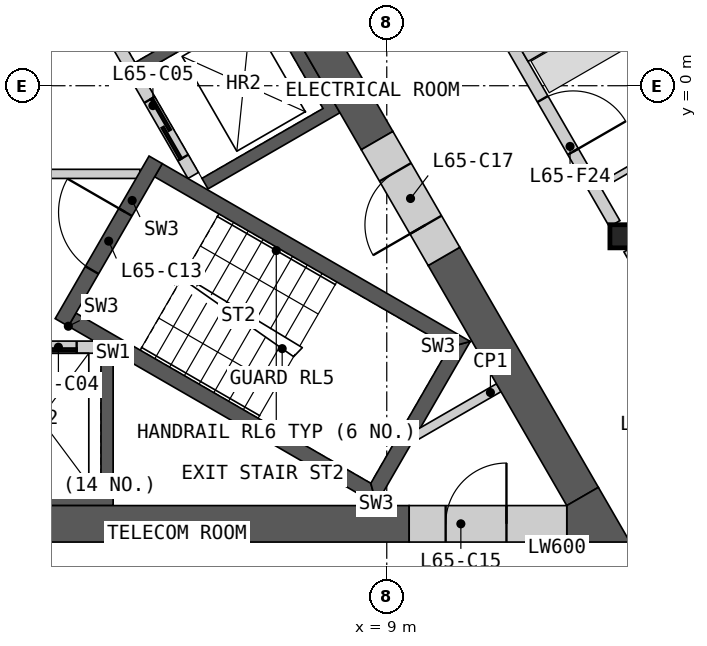
"""IFC4 building model, lengths in metres.
Left out: names, types, materials, properties, quantities, classifications, styles, units other than length and angle.
Written with IfcOpenShell. Run it as: python <this file> out.ifc"""

import sys

from ifc_helpers import new_model, si_unit, direction, frame, frame_2d, origin, origin_2d, place, context, subcontext, project, spatial, polyline, rectangle, i_section, outline, extrude, element, fill, save


model = new_model("IFC4")
c1 = context("Model", 3, precision=1e-05, world=origin(), true_north=direction((0.0, 1.0)))
c2 = subcontext(c1, "Body", "Model", "MODEL_VIEW")
j1 = project(units=[si_unit("LENGTHUNIT", "METRE"), si_unit("PLANEANGLEUNIT", "RADIAN")], contexts=[c1])
p1 = place(None, origin())
s1 = spatial("IfcSite", under=j1, at=p1, CompositionType="ELEMENT")
p2 = place(p1, origin())
s2 = spatial("IfcBuilding", under=s1, at=p2, CompositionType="ELEMENT")
p3 = place(p2, frame((0.0, 0.0, 301.8)))
s3 = spatial("IfcBuildingStorey", under=s2, at=p3, CompositionType="ELEMENT", Elevation=301.8)
p4 = place(p3, frame((12.868, -2.476, 0.0), z_axis=(0.0, 0.0, 1.0), x_axis=(1.0, 0.0, 0.0)))
e1 = element("IfcColumn", 1, at=p4, inside=s3, PredefinedType="COLUMN", context=c2, shape_type="SweptSolid", body=[
    extrude(i_section(OverallWidth=0.396, OverallDepth=0.381, WebThickness=0.019, FlangeThickness=0.03, at=origin_2d()), origin(), (0.0, 0.0, 1.0), 3.4),
])
p5 = place(p3, origin())
e2 = element("IfcWall", 2, at=p5, inside=s3, PredefinedType="SHEAR", context=c2, shape_type="SweptSolid", body=[
    extrude(outline(polyline([(4.5, -4.4), (4.5, -6.906), (-4.5, -6.906), (-4.5, -4.4), (-4.3, -4.4), (-4.3, -6.7), (-2.3, -6.7), (-2.3, -4.4), (-2.1, -4.4), (-2.1, -6.7), (-0.1, -6.7), (-0.1, -4.4), (0.1, -4.4), (0.1, -6.7), (2.1, -6.7), (2.1, -4.4), (2.3, -4.4), (2.3, -6.7), (4.3, -6.7), (4.3, -4.4), (4.5, -4.4)])), origin(), (0.0, 0.0, 1.0), 3.1),
])
p6 = place(p3, frame((-4.187, -4.3, 0.0), z_axis=(0.0, 0.0, 1.0), x_axis=(1.0, 0.0, 0.0)))
e3 = element("IfcWall", 3, at=p6, inside=s3, PredefinedType="SOLIDWALL", context=c2, shape_type="SweptSolid", body=[
    extrude(rectangle(XDim=8.373, YDim=0.2, at=frame_2d((4.187, 0.0))), origin(), (0.0, 0.0, 1.0), 3.1),
])
p7 = place(p6, frame((0.287, 0.0, 0.0)))
e4 = element("IfcOpeningElement", 4, at=p7, cuts=e3, PredefinedType="OPENING", context=c2, shape_type="SweptSolid", body=[
    extrude(rectangle(XDim=1.2, YDim=2.1, at=frame_2d((0.6, 1.05))), frame((0.0, 0.11, 0.0), z_axis=(0.0, -1.0, 0.0), x_axis=(1.0, 0.0, 0.0)), (0.0, 0.0, 1.0), 0.22),
])
p8 = place(p6, frame((2.387, 0.0, 0.0)))
e5 = element("IfcOpeningElement", 5, at=p8, cuts=e3, PredefinedType="OPENING", context=c2, shape_type="SweptSolid", body=[
    extrude(rectangle(XDim=1.4, YDim=2.1, at=frame_2d((0.7, 1.05))), frame((0.0, 0.11, 0.0), z_axis=(0.0, -1.0, 0.0), x_axis=(1.0, 0.0, 0.0)), (0.0, 0.0, 1.0), 0.22),
])
p9 = place(p6, frame((4.737, 0.0, 0.0)))
e6 = element("IfcOpeningElement", 6, at=p9, cuts=e3, PredefinedType="OPENING", context=c2, shape_type="SweptSolid", body=[
    extrude(rectangle(XDim=1.1, YDim=2.1, at=frame_2d((0.55, 1.05))), frame((0.0, 0.11, 0.0), z_axis=(0.0, -1.0, 0.0), x_axis=(1.0, 0.0, 0.0)), (0.0, 0.0, 1.0), 0.22),
])
p10 = place(p6, frame((6.887, 0.0, 0.0)))
e7 = element("IfcOpeningElement", 7, at=p10, cuts=e3, PredefinedType="OPENING", context=c2, shape_type="SweptSolid", body=[
    extrude(rectangle(XDim=1.2, YDim=2.1, at=frame_2d((0.6, 1.05))), frame((0.0, 0.11, 0.0), z_axis=(0.0, -1.0, 0.0), x_axis=(1.0, 0.0, 0.0)), (0.0, 0.0, 1.0), 0.22),
])
p11 = place(p3, origin())
e8 = element("IfcWall", 8, at=p11, inside=s3, PredefinedType="SHEAR", context=c2, shape_type="SweptSolid", body=[
    extrude(outline(polyline([(1.561, 6.097), (3.731, 7.35), (8.231, -0.444), (6.061, -1.697), (5.96, -1.524), (7.952, -0.374), (6.952, 1.358), (4.96, 0.208), (4.861, 0.381), (6.852, 1.531), (5.852, 3.263), (3.861, 2.113), (3.76, 2.287), (5.752, 3.437), (4.752, 5.169), (2.76, 4.019), (2.66, 4.192), (4.652, 5.342), (3.652, 7.074), (1.66, 5.924), (1.561, 6.097)])), origin(), (0.0, 0.0, 1.0), 3.1),
])
p12 = place(p3, frame((5.817, -1.476, 0.0), z_axis=(0.0, 0.0, 1.0), x_axis=(-0.500002616675, 0.866023893041, 0.0)))
e9 = element("IfcWall", 9, at=p12, inside=s3, PredefinedType="SOLIDWALL", context=c2, shape_type="SweptSolid", body=[
    extrude(rectangle(XDim=8.373, YDim=0.2, at=frame_2d((4.187, 0.0))), origin(), (0.0, 0.0, 1.0), 3.1),
])
p13 = place(p12, frame((0.337, 0.0, 0.0)))
e10 = element("IfcOpeningElement", 10, at=p13, cuts=e9, PredefinedType="OPENING", context=c2, shape_type="SweptSolid", body=[
    extrude(rectangle(XDim=1.1, YDim=2.1, at=frame_2d((0.55, 1.05))), frame((0.0, 0.11, 0.0), z_axis=(0.0, -1.0, 0.0), x_axis=(1.0, 0.0, 0.0)), (0.0, 0.0, 1.0), 0.22),
])
p14 = place(p12, frame((2.537, 0.0, 0.0)))
e11 = element("IfcOpeningElement", 11, at=p14, cuts=e9, PredefinedType="OPENING", context=c2, shape_type="SweptSolid", body=[
    extrude(rectangle(XDim=1.1, YDim=2.1, at=frame_2d((0.55, 1.05))), frame((0.0, 0.11, 0.0), z_axis=(0.0, -1.0, 0.0), x_axis=(1.0, 0.0, 0.0)), (0.0, 0.0, 1.0), 0.22),
])
p15 = place(p12, frame((4.737, 0.0, 0.0)))
e12 = element("IfcOpeningElement", 12, at=p15, cuts=e9, PredefinedType="OPENING", context=c2, shape_type="SweptSolid", body=[
    extrude(rectangle(XDim=1.1, YDim=2.1, at=frame_2d((0.55, 1.05))), frame((0.0, 0.11, 0.0), z_axis=(0.0, -1.0, 0.0), x_axis=(1.0, 0.0, 0.0)), (0.0, 0.0, 1.0), 0.22),
])
p16 = place(p12, frame((7.037, 0.0, 0.0)))
e13 = element("IfcOpeningElement", 13, at=p16, cuts=e9, PredefinedType="OPENING", context=c2, shape_type="SweptSolid", body=[
    extrude(rectangle(XDim=0.9, YDim=2.1, at=frame_2d((0.45, 1.05))), frame((0.0, 0.11, 0.0), z_axis=(0.0, -1.0, 0.0), x_axis=(1.0, 0.0, 0.0)), (0.0, 0.0, 1.0), 0.22),
])
p17 = place(p3, frame((-4.941, -1.45, 0.0), z_axis=(0.0, 0.0, 1.0), x_axis=(1.0, 0.0, 0.0)))
e14 = element("IfcWall", 14, at=p17, inside=s3, PredefinedType="PARTITIONING", context=c2, shape_type="SweptSolid", body=[
    extrude(rectangle(XDim=9.882, YDim=0.15, at=frame_2d((4.941, 0.0))), origin(), (0.0, 0.0, 1.0), 3.1),
])
p18 = place(p17, frame((4.391, 0.0, 0.0)))
e15 = element("IfcOpeningElement", 15, at=p18, cuts=e14, PredefinedType="OPENING", context=c2, shape_type="SweptSolid", body=[
    extrude(rectangle(XDim=1.1, YDim=2.1, at=frame_2d((0.55, 1.05))), frame((0.0, 0.085, 0.0), z_axis=(0.0, -1.0, 0.0), x_axis=(1.0, 0.0, 0.0)), (0.0, 0.0, 1.0), 0.17),
])
p19 = place(p3, origin())
e16 = element("IfcWall", 16, at=p19, inside=s3, PredefinedType="SHEAR", context=c2, shape_type="SweptSolid", body=[
    extrude(outline(polyline([(3.763, -3.956), (8.83, -6.881), (8.738, -6.539), (3.888, -3.739), (3.763, -3.956)])), origin(), (0.0, 0.0, 1.0), 3.1),
])
p20 = place(p3, origin())
e17 = element("IfcWall", 17, at=p20, inside=s3, PredefinedType="SHEAR", context=c2, shape_type="SweptSolid", body=[
    extrude(outline(polyline([(8.83, -6.881), (10.374, -4.206), (10.032, -4.298), (8.738, -6.539), (8.83, -6.881)])), origin(), (0.0, 0.0, 1.0), 3.1),
])
p21 = place(p3, origin())
e18 = element("IfcWall", 18, at=p21, inside=s3, PredefinedType="SHEAR", context=c2, shape_type="SweptSolid", body=[
    extrude(outline(polyline([(10.032, -4.298), (10.374, -4.206), (5.307, -1.281), (5.182, -1.498), (10.032, -4.298)])), origin(), (0.0, 0.0, 1.0), 3.1),
])
p22 = place(p3, frame((3.655, -3.893, 0.0), z_axis=(0.0, 0.0, 1.0), x_axis=(0.499982516597, 0.866035497597, 0.0)))
e19 = element("IfcWall", 19, at=p22, inside=s3, PredefinedType="SHEAR", context=c2, shape_type="SweptSolid", body=[
    extrude(rectangle(XDim=3.088, YDim=0.25, at=frame_2d((1.544, 0.0))), origin(), (0.0, 0.0, 1.0), 3.1),
])
p23 = place(p22, frame((0.994, 0.0, 0.0)))
e20 = element("IfcOpeningElement", 20, at=p23, cuts=e19, PredefinedType="OPENING", context=c2, shape_type="SweptSolid", body=[
    extrude(rectangle(XDim=1.1, YDim=2.1, at=frame_2d((0.55, 1.05))), frame((0.0, 0.135, 0.0), z_axis=(0.0, -1.0, 0.0), x_axis=(1.0, 0.0, 0.0)), (0.0, 0.0, 1.0), 0.27),
])
p24 = place(p3, frame((10.842, -4.967, 0.0), z_axis=(0.0, 0.0, 1.0), x_axis=(-0.866098216386, -0.499873863663, 0.0)))
e21 = element("IfcWall", 21, at=p24, inside=s3, PredefinedType="PARTITIONING", context=c2, shape_type="SweptSolid", body=[
    extrude(rectangle(XDim=1.582, YDim=0.15, at=frame_2d((0.791, 0.0))), origin(), (0.0, 0.0, 1.0), 3.1),
])
p25 = place(p3, frame((-4.892, -7.206, 0.0), z_axis=(0.0, 0.0, 1.0), x_axis=(1.0, 0.0, 0.0)))
e22 = element("IfcWall", 22, at=p25, inside=s3, PredefinedType="SHEAR", context=c2, shape_type="SweptSolid", body=[
    extrude(rectangle(XDim=14.261, YDim=0.6, at=frame_2d((7.13, 0.0))), origin(), (0.0, 0.0, 1.0), 3.1),
])
p26 = place(p3, frame((8.841, -0.902, 0.0), z_axis=(0.0, 0.0, 1.0), x_axis=(-0.499995618375, 0.866027933502, 0.0)))
e23 = element("IfcWall", 23, at=p26, inside=s3, PredefinedType="SHEAR", context=c2, shape_type="SweptSolid", body=[
    extrude(rectangle(XDim=14.571, YDim=0.6, at=frame_2d((7.285, 0.0))), origin(), (0.0, 0.0, 1.0), 3.1),
])
p27 = place(p3, frame((12.221, -6.756, 0.0), z_axis=(0.0, 0.0, 1.0), x_axis=(-0.500020646047, 0.866013483456, 0.0)))
e24 = element("IfcWall", 24, at=p27, inside=s3, PredefinedType="SHEAR", context=c2, shape_type="SweptSolid", body=[
    extrude(rectangle(XDim=4.559, YDim=0.6, at=frame_2d((2.28, 0.0))), origin(), (0.0, 0.0, 1.0), 3.1),
])
p28 = place(p3, origin())
e25 = element("IfcWall", 25, at=p28, inside=s3, PredefinedType="SHEAR", context=c2, shape_type="SweptSolid", body=[
    extrude(outline(polyline([(11.961, -7.506), (11.961, -6.906), (12.48, -6.606), (13.0, -7.506), (11.961, -7.506)])), origin(), (0.0, 0.0, 1.0), 3.1),
])
p29 = place(p3, frame((9.369, -7.206, 0.0), z_axis=(0.0, 0.0, 1.0), x_axis=(1.0, 0.0, 0.0)))
e26 = element("IfcWall", 26, at=p29, inside=s3, PredefinedType="SHEAR", context=c2, shape_type="SweptSolid", body=[
    extrude(rectangle(XDim=2.592, YDim=0.6, at=frame_2d((1.296, 0.0))), origin(), (0.0, 0.0, 1.0), 3.1),
])
p30 = place(p29, frame((0.6, 0.0, 0.0)))
e27 = element("IfcOpeningElement", 27, at=p30, cuts=e26, PredefinedType="OPENING", context=c2, shape_type="SweptSolid", body=[
    extrude(rectangle(XDim=1.0, YDim=2.1, at=frame_2d((0.5, 1.05))), frame((0.0, 0.31, 0.0), z_axis=(0.0, -1.0, 0.0), x_axis=(1.0, 0.0, 0.0)), (0.0, 0.0, 1.0), 0.62),
])
p31 = place(p3, frame((9.941, -2.807, 0.0), z_axis=(0.0, 0.0, 1.0), x_axis=(-0.499994660107, 0.866028486751, 0.0)))
e28 = element("IfcWall", 28, at=p31, inside=s3, PredefinedType="SHEAR", context=c2, shape_type="SweptSolid", body=[
    extrude(rectangle(XDim=2.2, YDim=0.6, at=frame_2d((1.1, 0.0))), origin(), (0.0, 0.0, 1.0), 3.1),
])
p32 = place(p31, frame((0.6, 0.0, 0.0)))
e29 = element("IfcOpeningElement", 29, at=p32, cuts=e28, PredefinedType="OPENING", context=c2, shape_type="SweptSolid", body=[
    extrude(rectangle(XDim=1.0, YDim=2.1, at=frame_2d((0.5, 1.05))), frame((0.0, 0.31, 0.0), z_axis=(0.0, -1.0, 0.0), x_axis=(1.0, 0.0, 0.0)), (0.0, 0.0, 1.0), 0.62),
])
p33 = place(p3, frame((8.698, 4.745, 0.0), z_axis=(0.0, 0.0, 1.0), x_axis=(0.499984266882, -0.866034487114, 0.0)))
e30 = element("IfcWall", 30, at=p33, inside=s3, PredefinedType="PARTITIONING", context=c2, shape_type="SweptSolid", body=[
    extrude(rectangle(XDim=8.099, YDim=0.2, at=frame_2d((4.049, 0.0))), origin(), (0.0, 0.0, 1.0), 3.1),
])
p34 = place(p33, frame((5.732, 0.0, 0.0)))
e31 = element("IfcOpeningElement", 31, at=p34, cuts=e30, PredefinedType="OPENING", context=c2, shape_type="SweptSolid", body=[
    extrude(rectangle(XDim=1.0, YDim=2.1, at=frame_2d((0.5, 1.05))), frame((0.0, 0.11, 0.0), z_axis=(0.0, -1.0, 0.0), x_axis=(1.0, 0.0, 0.0)), (0.0, 0.0, 1.0), 0.22),
])
p35 = place(p3, frame((11.26, 0.507, 0.0), z_axis=(0.0, 0.0, 1.0), x_axis=(0.86602842894, 0.499994760241, 0.0)))
e32 = element("IfcWall", 32, at=p35, inside=s3, PredefinedType="PARTITIONING", context=c2, shape_type="SweptSolid", body=[
    extrude(rectangle(XDim=7.968, YDim=0.25, at=frame_2d((3.984, 0.0))), origin(), (0.0, 0.0, 1.0), 2.33),
])
p36 = place(p3, frame((12.988, -2.684, 0.0), z_axis=(0.0, 0.0, 1.0), x_axis=(0.500003406062, -0.866023437285, 0.0)))
e33 = element("IfcWall", 33, at=p36, inside=s3, PredefinedType="PARTITIONING", context=c2, shape_type="SweptSolid", body=[
    extrude(rectangle(XDim=4.288, YDim=0.2, at=frame_2d((2.144, 0.0))), origin(), (0.0, 0.0, 1.0), 3.1),
])
p37 = place(p36, frame((2.521, 0.0, 0.0)))
e34 = element("IfcOpeningElement", 34, at=p37, cuts=e33, PredefinedType="OPENING", context=c2, shape_type="SweptSolid", body=[
    extrude(rectangle(XDim=1.0, YDim=2.1, at=frame_2d((0.5, 1.05))), frame((0.0, 0.11, 0.0), z_axis=(0.0, -1.0, 0.0), x_axis=(1.0, 0.0, 0.0)), (0.0, 0.0, 1.0), 0.22),
])
p38 = place(p3, frame((12.506, -1.65, 0.0), z_axis=(0.0, 0.0, 1.0), x_axis=(0.866030925526, 0.499990435942, 0.0)))
e35 = element("IfcWall", 35, at=p38, inside=s3, PredefinedType="PARTITIONING", context=c2, shape_type="SweptSolid", body=[
    extrude(rectangle(XDim=2.55, YDim=0.1, at=frame_2d((1.275, 0.0))), origin(), (0.0, 0.0, 1.0), 2.33),
])
p39 = place(p10, origin())
e36 = element("IfcDoor", 36, at=p39, inside=s3, OperationType="SLIDING_TO_LEFT", PredefinedType="DOOR", context=c2, shape_type="SweptSolid", body=[
    extrude(rectangle(XDim=1.2, YDim=2.1, at=frame_2d((0.6, 1.05))), frame((0.0, 0.025, 0.0), z_axis=(0.0, -1.0, 0.0), x_axis=(1.0, 0.0, 0.0)), (0.0, 0.0, 1.0), 0.05),
])
fill(e7, e36)
p40 = place(p13, origin())
e37 = element("IfcDoor", 37, at=p40, inside=s3, OperationType="SLIDING_TO_LEFT", PredefinedType="DOOR", context=c2, shape_type="SweptSolid", body=[
    extrude(rectangle(XDim=1.1, YDim=2.1, at=frame_2d((0.55, 1.05))), frame((0.0, 0.025, 0.0), z_axis=(0.0, -1.0, 0.0), x_axis=(1.0, 0.0, 0.0)), (0.0, 0.0, 1.0), 0.05),
])
fill(e10, e37)
p41 = place(p23, origin())
e38 = element("IfcDoor", 38, at=p41, inside=s3, OperationType="SINGLE_SWING_RIGHT", PredefinedType="DOOR", context=c2, shape_type="SweptSolid", body=[
    extrude(rectangle(XDim=1.1, YDim=2.1, at=frame_2d((0.55, 1.05))), frame((0.0, 0.025, 0.0), z_axis=(0.0, -1.0, 0.0), x_axis=(1.0, 0.0, 0.0)), (0.0, 0.0, 1.0), 0.05),
])
fill(e20, e38)
p42 = place(p30, origin())
e39 = element("IfcDoor", 39, at=p42, inside=s3, OperationType="SINGLE_SWING_RIGHT", PredefinedType="DOOR", context=c2, shape_type="SweptSolid", body=[
    extrude(rectangle(XDim=1.0, YDim=2.1, at=frame_2d((0.5, 1.05))), frame((0.0, 0.055, 0.0), z_axis=(0.0, -1.0, 0.0), x_axis=(1.0, 0.0, 0.0)), (0.0, 0.0, 1.0), 0.05),
])
fill(e27, e39)
p43 = place(p32, origin())
e40 = element("IfcDoor", 40, at=p43, inside=s3, OperationType="SINGLE_SWING_LEFT", PredefinedType="DOOR", context=c2, shape_type="SweptSolid", body=[
    extrude(rectangle(XDim=1.0, YDim=2.1, at=frame_2d((0.5, 1.05))), frame((0.0, 0.055, 0.0), z_axis=(0.0, -1.0, 0.0), x_axis=(1.0, 0.0, 0.0)), (0.0, 0.0, 1.0), 0.05),
])
fill(e29, e40)
p44 = place(p34, origin())
e41 = element("IfcDoor", 41, at=p44, inside=s3, OperationType="SINGLE_SWING_RIGHT", PredefinedType="DOOR", context=c2, shape_type="SweptSolid", body=[
    extrude(rectangle(XDim=1.0, YDim=2.1, at=frame_2d((0.5, 1.05))), frame((0.0, 0.025, 0.0), z_axis=(0.0, -1.0, 0.0), x_axis=(1.0, 0.0, 0.0)), (0.0, 0.0, 1.0), 0.05),
])
fill(e31, e41)
save(model, sys.argv[1])
